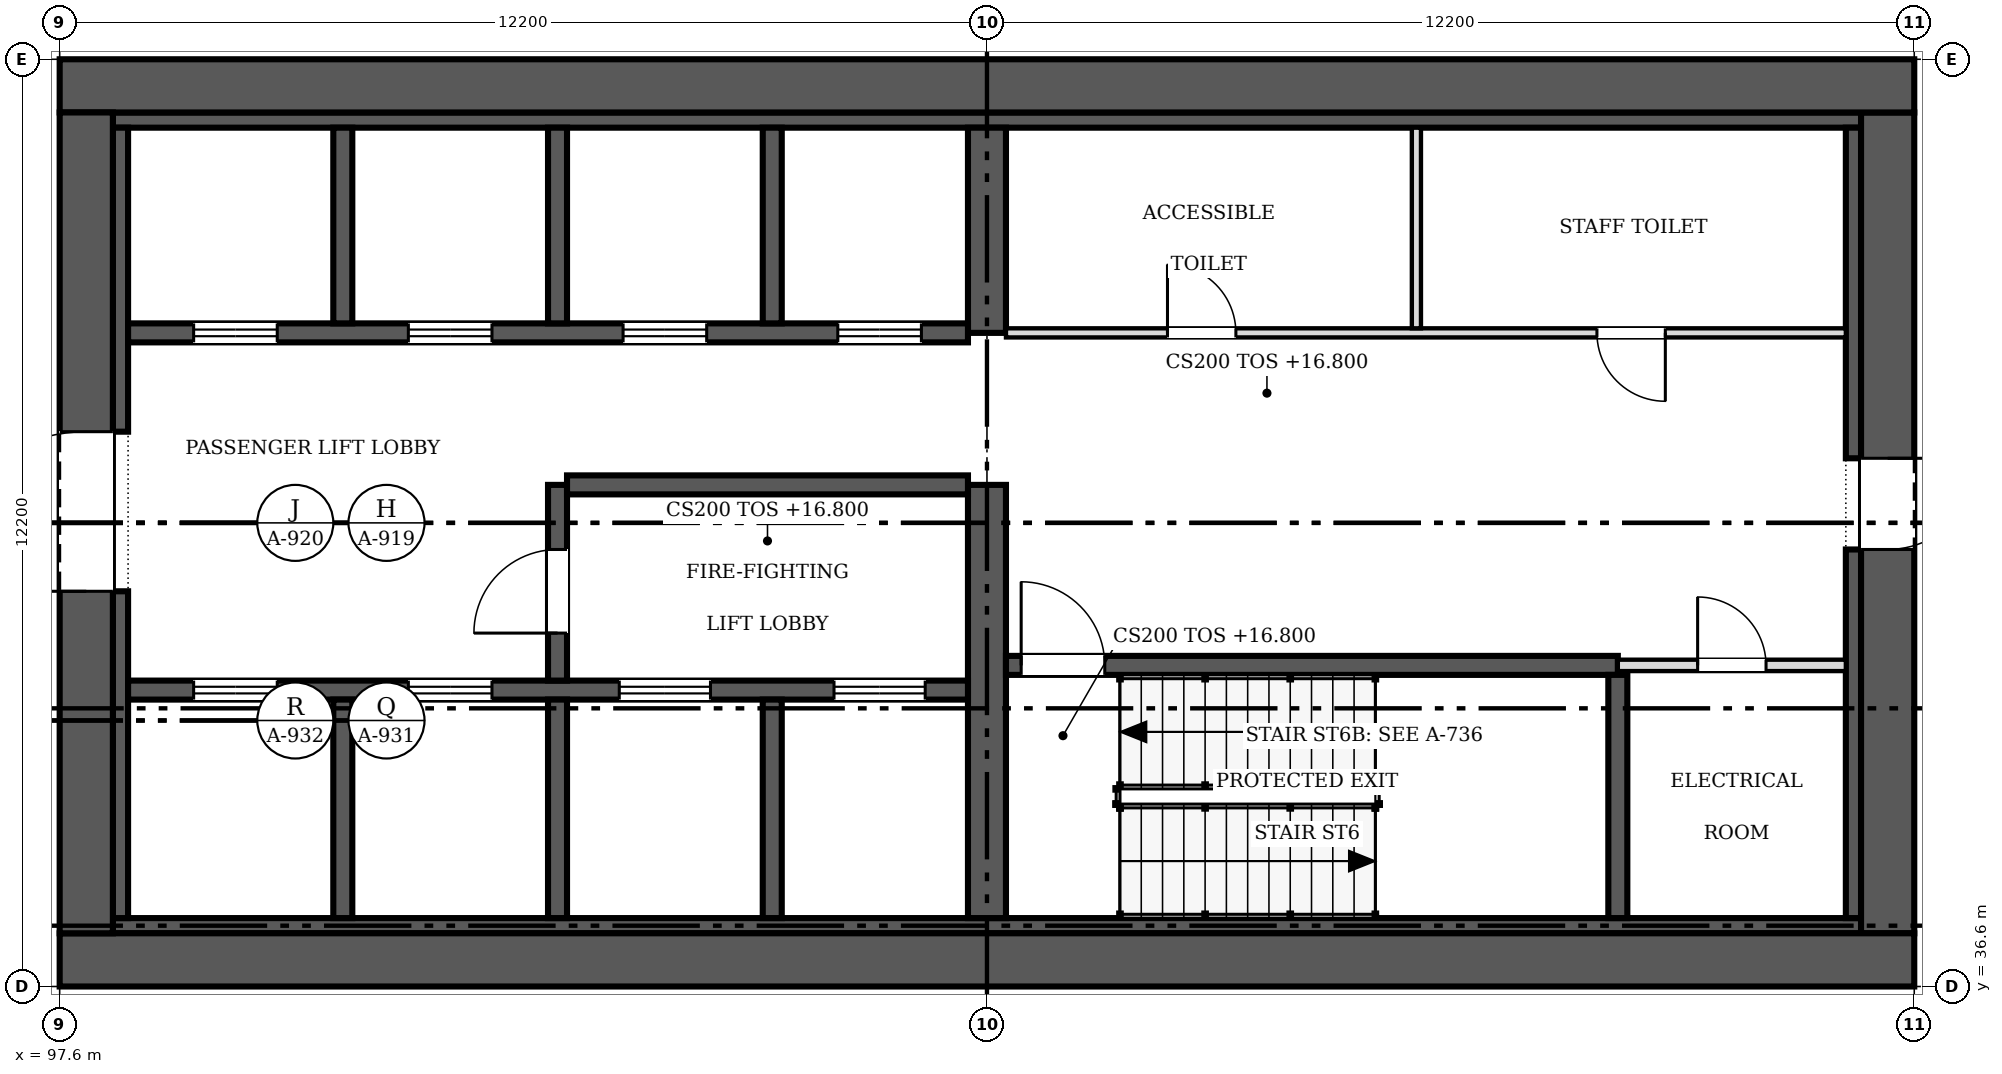
"""IFC4 building model, lengths in metres.
Left out: names, types, materials, properties, quantities, classifications, styles, units other than length and angle.
Written with IfcOpenShell. Run it as: python <this file> out.ifc"""

import sys

from ifc_helpers import new_model, si_unit, direction, frame, frame_2d, origin, place, context, subcontext, project, spatial, rectangle, extrude, source, transform, mapped, element, fill, save


model = new_model("IFC4")
c1 = context("Model", 3, precision=1e-05, world=origin(), true_north=direction((0.0, 1.0)))
c2 = subcontext(c1, "Body", "Model", "MODEL_VIEW")
j1 = project(units=[si_unit("LENGTHUNIT", "METRE"), si_unit("PLANEANGLEUNIT", "RADIAN")], contexts=[c1])
p1 = place(None, origin())
s1 = spatial("IfcSite", under=j1, at=p1, CompositionType="ELEMENT")
p2 = place(p1, origin())
s2 = spatial("IfcBuilding", under=s1, at=p2, CompositionType="ELEMENT")
p3 = place(p2, frame((0.0, 0.0, 16.8)))
s3 = spatial("IfcBuildingStorey", under=s2, at=p3, CompositionType="ELEMENT", Elevation=16.8)
p4 = place(p3, frame((122.0, 36.95, 0.0), z_axis=(0.0, 0.0, 1.0), x_axis=(-1.0, 0.0, 0.0)))
e1 = element("IfcWall", 1, at=p4, inside=s3, PredefinedType="SHEAR", context=c2, shape_type="SweptSolid", body=[
    extrude(rectangle(XDim=24.4, YDim=0.7, at=frame_2d((12.2, 0.0))), origin(), (0.0, 0.0, 1.0), 4.5),
])
p5 = place(p3, frame((97.95, 37.3, 0.0), z_axis=(0.0, 0.0, 1.0), x_axis=(0.0, 1.0, 0.0)))
e2 = element("IfcWall", 2, at=p5, inside=s3, PredefinedType="SHEAR", context=c2, shape_type="SweptSolid", body=[
    extrude(rectangle(XDim=10.8, YDim=0.7, at=frame_2d((5.4, 0.0))), origin(), (0.0, 0.0, 1.0), 4.5),
])
m1 = source(origin(), c2, "Body", "SweptSolid", [
    extrude(rectangle(XDim=2.1, YDim=2.4, at=frame_2d((1.05, 1.2))), frame((0.0, 0.36, 0.0), z_axis=(0.0, -1.0, 0.0), x_axis=(1.0, 0.0, 0.0)), (0.0, 0.0, 1.0), 0.72),
])
p6 = place(p5, frame((4.5, 0.0, 0.0)))
e3 = element("IfcOpeningElement", 3, at=p6, cuts=e2, PredefinedType="OPENING", context=c2, shape_type="MappedRepresentation", body=[
    mapped(m1, transform((0.0, 0.0, 0.0), scale=1.0)),
])
p7 = place(p3, frame((97.6, 48.45, 0.0), z_axis=(0.0, 0.0, 1.0), x_axis=(1.0, 0.0, 0.0)))
e4 = element("IfcWall", 4, at=p7, inside=s3, PredefinedType="SHEAR", context=c2, shape_type="SweptSolid", body=[
    extrude(rectangle(XDim=24.4, YDim=0.7, at=frame_2d((12.2, 0.0))), origin(), (0.0, 0.0, 1.0), 4.5),
])
p8 = place(p3, frame((121.65, 48.1, 0.0), z_axis=(0.0, 0.0, 1.0), x_axis=(0.0, -1.0, 0.0)))
e5 = element("IfcWall", 5, at=p8, inside=s3, PredefinedType="SHEAR", context=c2, shape_type="SweptSolid", body=[
    extrude(rectangle(XDim=10.8, YDim=0.7, at=frame_2d((5.4, 0.0))), origin(), (0.0, 0.0, 1.0), 4.5),
])
m2 = source(origin(), c2, "Body", "SweptSolid", [
    extrude(rectangle(XDim=1.2, YDim=2.1, at=frame_2d((0.6, 1.05))), frame((0.0, 0.36, 0.0), z_axis=(0.0, -1.0, 0.0), x_axis=(1.0, 0.0, 0.0)), (0.0, 0.0, 1.0), 0.72),
])
p9 = place(p8, frame((4.55, 0.0, 0.0)))
e6 = element("IfcOpeningElement", 6, at=p9, cuts=e5, PredefinedType="OPENING", context=c2, shape_type="MappedRepresentation", body=[
    mapped(m2, transform((0.0, 0.0, 0.0), scale=1.0)),
])
for number, where, z_axis, x_axis in (
    (7, (98.3, 37.4, 0.0), (0.0, 0.0, 1.0), (1.0, 0.0, 0.0)),
    (8, (98.3, 48.0, 0.0), (0.0, 0.0, 1.0), (1.0, 0.0, 0.0)),
):
    element("IfcWall", number, at=place(p3, frame(where, z_axis=z_axis, x_axis=x_axis)), inside=s3, PredefinedType="SOLIDWALL", context=c2, shape_type="SweptSolid", body=[
        extrude(rectangle(XDim=23.0, YDim=0.2, at=frame_2d((11.5, 0.0))), origin(), (0.0, 0.0, 1.0), 4.5),
    ])
p10 = place(p3, frame((98.4, 37.5, 0.0), z_axis=(0.0, 0.0, 1.0), x_axis=(0.0, 1.0, 0.0)))
e9 = element("IfcWall", 9, at=p10, inside=s3, PredefinedType="SOLIDWALL", context=c2, shape_type="SweptSolid", body=[
    extrude(rectangle(XDim=4.3, YDim=0.2, at=frame_2d((2.15, 0.0))), origin(), (0.0, 0.0, 1.0), 4.5),
])
p11 = place(p3, frame((98.4, 43.9, 0.0), z_axis=(0.0, 0.0, 1.0), x_axis=(0.0, 1.0, 0.0)))
e10 = element("IfcWall", 10, at=p11, inside=s3, PredefinedType="SOLIDWALL", context=c2, shape_type="SweptSolid", body=[
    extrude(rectangle(XDim=4.0, YDim=0.2, at=frame_2d((2.0, 0.0))), origin(), (0.0, 0.0, 1.0), 4.5),
])
p12 = place(p3, frame((121.2, 37.5, 0.0), z_axis=(0.0, 0.0, 1.0), x_axis=(0.0, 1.0, 0.0)))
e11 = element("IfcWall", 11, at=p12, inside=s3, PredefinedType="SOLIDWALL", context=c2, shape_type="SweptSolid", body=[
    extrude(rectangle(XDim=4.85, YDim=0.2, at=frame_2d((2.425, 0.0))), origin(), (0.0, 0.0, 1.0), 4.5),
])
p13 = place(p3, frame((121.2, 43.55, 0.0), z_axis=(0.0, 0.0, 1.0), x_axis=(0.0, 1.0, 0.0)))
e12 = element("IfcWall", 12, at=p13, inside=s3, PredefinedType="SOLIDWALL", context=c2, shape_type="SweptSolid", body=[
    extrude(rectangle(XDim=4.35, YDim=0.2, at=frame_2d((2.175, 0.0))), origin(), (0.0, 0.0, 1.0), 4.5),
])
p14 = place(p3, frame((109.8, 37.5, 0.0), z_axis=(0.0, 0.0, 1.0), x_axis=(0.0, 1.0, 0.0)))
e13 = element("IfcWall", 13, at=p14, inside=s3, PredefinedType="SHEAR", context=c2, shape_type="SweptSolid", body=[
    extrude(rectangle(XDim=5.7, YDim=0.5, at=frame_2d((2.85, 0.0))), origin(), (0.0, 0.0, 1.0), 4.5),
])
p15 = place(p3, frame((109.8, 45.2, 0.0), z_axis=(0.0, 0.0, 1.0), x_axis=(0.0, 1.0, 0.0)))
e14 = element("IfcWall", 14, at=p15, inside=s3, PredefinedType="SHEAR", context=c2, shape_type="SweptSolid", body=[
    extrude(rectangle(XDim=2.7, YDim=0.5, at=frame_2d((1.35, 0.0))), origin(), (0.0, 0.0, 1.0), 4.5),
])
p16 = place(p3, frame((98.5, 40.5, 0.0), z_axis=(0.0, 0.0, 1.0), x_axis=(1.0, 0.0, 0.0)))
e15 = element("IfcWall", 15, at=p16, inside=s3, PredefinedType="SOLIDWALL", context=c2, shape_type="SweptSolid", body=[
    extrude(rectangle(XDim=11.05, YDim=0.25, at=frame_2d((5.525, 0.0))), origin(), (0.0, 0.0, 1.0), 4.5),
])
m3 = source(origin(), c2, "Body", "SweptSolid", [
    extrude(rectangle(XDim=1.1, YDim=2.1, at=frame_2d((0.55, 1.05))), frame((0.0, 0.135, 0.0), z_axis=(0.0, -1.0, 0.0), x_axis=(1.0, 0.0, 0.0)), (0.0, 0.0, 1.0), 0.27),
])
p17 = place(p16, frame((0.863, 0.0, 0.0)))
e16 = element("IfcOpeningElement", 16, at=p17, cuts=e15, PredefinedType="OPENING", context=c2, shape_type="MappedRepresentation", body=[
    mapped(m3, transform((0.0, 0.0, 0.0), scale=1.0)),
])
p18 = place(p16, frame((3.688, 0.0, 0.0)))
e17 = element("IfcOpeningElement", 17, at=p18, cuts=e15, PredefinedType="OPENING", context=c2, shape_type="MappedRepresentation", body=[
    mapped(m3, transform((0.0, 0.0, 0.0), scale=1.0)),
])
m4 = source(origin(), c2, "Body", "SweptSolid", [
    extrude(rectangle(XDim=1.2, YDim=2.1, at=frame_2d((0.6, 1.05))), frame((0.0, 0.135, 0.0), z_axis=(0.0, -1.0, 0.0), x_axis=(1.0, 0.0, 0.0)), (0.0, 0.0, 1.0), 0.27),
])
p19 = place(p16, frame((6.462, 0.0, 0.0)))
e18 = element("IfcOpeningElement", 18, at=p19, cuts=e15, PredefinedType="OPENING", context=c2, shape_type="MappedRepresentation", body=[
    mapped(m4, transform((0.0, 0.0, 0.0), scale=1.0)),
])
p20 = place(p16, frame((9.288, 0.0, 0.0)))
e19 = element("IfcOpeningElement", 19, at=p20, cuts=e15, PredefinedType="OPENING", context=c2, shape_type="MappedRepresentation", body=[
    mapped(m4, transform((0.0, 0.0, 0.0), scale=1.0)),
])
p21 = place(p3, frame((109.55, 45.2, 0.0), z_axis=(0.0, 0.0, 1.0), x_axis=(-1.0, 0.0, 0.0)))
e20 = element("IfcWall", 20, at=p21, inside=s3, PredefinedType="SOLIDWALL", context=c2, shape_type="SweptSolid", body=[
    extrude(rectangle(XDim=11.05, YDim=0.25, at=frame_2d((5.525, 0.0))), origin(), (0.0, 0.0, 1.0), 4.5),
])
p22 = place(p21, frame((9.087, 0.0, 0.0)))
e21 = element("IfcOpeningElement", 21, at=p22, cuts=e20, PredefinedType="OPENING", context=c2, shape_type="MappedRepresentation", body=[
    mapped(m3, transform((0.0, 0.0, 0.0), scale=1.0)),
])
p23 = place(p21, frame((6.262, 0.0, 0.0)))
e22 = element("IfcOpeningElement", 22, at=p23, cuts=e20, PredefinedType="OPENING", context=c2, shape_type="MappedRepresentation", body=[
    mapped(m3, transform((0.0, 0.0, 0.0), scale=1.0)),
])
p24 = place(p21, frame((3.438, 0.0, 0.0)))
e23 = element("IfcOpeningElement", 23, at=p24, cuts=e20, PredefinedType="OPENING", context=c2, shape_type="MappedRepresentation", body=[
    mapped(m3, transform((0.0, 0.0, 0.0), scale=1.0)),
])
p25 = place(p21, frame((0.613, 0.0, 0.0)))
e24 = element("IfcOpeningElement", 24, at=p25, cuts=e20, PredefinedType="OPENING", context=c2, shape_type="MappedRepresentation", body=[
    mapped(m3, transform((0.0, 0.0, 0.0), scale=1.0)),
])
p26 = place(p3, frame((118.1, 40.825, 0.0), z_axis=(0.0, 0.0, 1.0), x_axis=(-1.0, 0.0, 0.0)))
e25 = element("IfcWall", 25, at=p26, inside=s3, PredefinedType="SOLIDWALL", context=c2, shape_type="SweptSolid", body=[
    extrude(rectangle(XDim=8.05, YDim=0.25, at=frame_2d((4.025, 0.0))), origin(), (0.0, 0.0, 1.0), 4.5),
])
p27 = place(p26, frame((6.75, 0.0, 0.0)))
e26 = element("IfcOpeningElement", 26, at=p27, cuts=e25, PredefinedType="OPENING", context=c2, shape_type="MappedRepresentation", body=[
    mapped(m3, transform((0.0, 0.0, 0.0), scale=1.0)),
])
p28 = place(p3, frame((104.15, 37.5, 0.0), z_axis=(0.0, 0.0, 1.0), x_axis=(0.0, 1.0, 0.0)))
e27 = element("IfcWall", 27, at=p28, inside=s3, PredefinedType="SOLIDWALL", context=c2, shape_type="SweptSolid", body=[
    extrude(rectangle(XDim=2.875, YDim=0.25, at=frame_2d((1.438, 0.0))), origin(), (0.0, 0.0, 1.0), 4.5),
])
p29 = place(p3, frame((104.15, 43.2, 0.0), z_axis=(0.0, 0.0, 1.0), x_axis=(0.0, -1.0, 0.0)))
e28 = element("IfcWall", 28, at=p29, inside=s3, PredefinedType="SOLIDWALL", context=c2, shape_type="SweptSolid", body=[
    extrude(rectangle(XDim=2.575, YDim=0.25, at=frame_2d((1.288, 0.0))), origin(), (0.0, 0.0, 1.0), 4.5),
])
p30 = place(p29, frame((0.85, 0.0, 0.0)))
e29 = element("IfcOpeningElement", 29, at=p30, cuts=e28, PredefinedType="OPENING", context=c2, shape_type="MappedRepresentation", body=[
    mapped(m3, transform((0.0, 0.0, 0.0), scale=1.0)),
])
p31 = place(p3, frame((104.275, 43.2, 0.0), z_axis=(0.0, 0.0, 1.0), x_axis=(1.0, 0.0, 0.0)))
e30 = element("IfcWall", 30, at=p31, inside=s3, PredefinedType="SOLIDWALL", context=c2, shape_type="SweptSolid", body=[
    extrude(rectangle(XDim=5.275, YDim=0.25, at=frame_2d((2.638, 0.0))), origin(), (0.0, 0.0, 1.0), 4.5),
])
p32 = place(p3, frame((118.1, 37.5, 0.0), z_axis=(0.0, 0.0, 1.0), x_axis=(0.0, 1.0, 0.0)))
e31 = element("IfcWall", 31, at=p32, inside=s3, PredefinedType="SOLIDWALL", context=c2, shape_type="SweptSolid", body=[
    extrude(rectangle(XDim=3.2, YDim=0.25, at=frame_2d((1.6, 0.0))), origin(), (0.0, 0.0, 1.0), 4.5),
])
for number, where, z_axis, x_axis in (
    (32, (101.325, 37.5, 0.0), (0.0, 0.0, 1.0), (0.0, 1.0, 0.0)),
    (33, (106.975, 37.5, 0.0), (0.0, 0.0, 1.0), (0.0, 1.0, 0.0)),
):
    element("IfcWall", number, at=place(p3, frame(where, z_axis=z_axis, x_axis=x_axis)), inside=s3, PredefinedType="SOLIDWALL", context=c2, shape_type="SweptSolid", body=[
        extrude(rectangle(XDim=2.875, YDim=0.25, at=frame_2d((1.438, 0.0))), origin(), (0.0, 0.0, 1.0), 4.5),
    ])
for number, where, z_axis, x_axis in (
    (34, (101.325, 45.325, 0.0), (0.0, 0.0, 1.0), (0.0, 1.0, 0.0)),
    (35, (104.15, 45.325, 0.0), (0.0, 0.0, 1.0), (0.0, 1.0, 0.0)),
    (36, (106.975, 45.325, 0.0), (0.0, 0.0, 1.0), (0.0, 1.0, 0.0)),
):
    element("IfcWall", number, at=place(p3, frame(where, z_axis=z_axis, x_axis=x_axis)), inside=s3, PredefinedType="SOLIDWALL", context=c2, shape_type="SweptSolid", body=[
        extrude(rectangle(XDim=2.575, YDim=0.25, at=frame_2d((1.288, 0.0))), origin(), (0.0, 0.0, 1.0), 4.5),
    ])
p33 = place(p3, frame((110.05, 45.2, 0.0), z_axis=(0.0, 0.0, 1.0), x_axis=(1.0, 0.0, 0.0)))
e37 = element("IfcWall", 37, at=p33, inside=s3, PredefinedType="PARTITIONING", context=c2, shape_type="SweptSolid", body=[
    extrude(rectangle(XDim=11.05, YDim=0.12, at=frame_2d((5.525, 0.0))), origin(), (0.0, 0.0, 1.0), 4.3),
])
m5 = source(origin(), c2, "Body", "SweptSolid", [
    extrude(rectangle(XDim=0.9, YDim=2.1, at=frame_2d((0.45, 1.05))), frame((0.0, 0.07, 0.0), z_axis=(0.0, -1.0, 0.0), x_axis=(1.0, 0.0, 0.0)), (0.0, 0.0, 1.0), 0.14),
])
p34 = place(p33, frame((2.125, 0.0, 0.0)))
e38 = element("IfcOpeningElement", 38, at=p34, cuts=e37, PredefinedType="OPENING", context=c2, shape_type="MappedRepresentation", body=[
    mapped(m5, transform((0.0, 0.0, 0.0), scale=1.0)),
])
p35 = place(p33, frame((7.775, 0.0, 0.0)))
e39 = element("IfcOpeningElement", 39, at=p35, cuts=e37, PredefinedType="OPENING", context=c2, shape_type="MappedRepresentation", body=[
    mapped(m5, transform((0.0, 0.0, 0.0), scale=1.0)),
])
p36 = place(p3, frame((121.1, 40.825, 0.0), z_axis=(0.0, 0.0, 1.0), x_axis=(-1.0, 0.0, 0.0)))
e40 = element("IfcWall", 40, at=p36, inside=s3, PredefinedType="PARTITIONING", context=c2, shape_type="SweptSolid", body=[
    extrude(rectangle(XDim=3.0, YDim=0.15, at=frame_2d((1.5, 0.0))), origin(), (0.0, 0.0, 1.0), 4.3),
])
m6 = source(origin(), c2, "Body", "SweptSolid", [
    extrude(rectangle(XDim=0.9, YDim=2.1, at=frame_2d((0.45, 1.05))), frame((0.0, 0.085, 0.0), z_axis=(0.0, -1.0, 0.0), x_axis=(1.0, 0.0, 0.0)), (0.0, 0.0, 1.0), 0.17),
])
p37 = place(p36, frame((1.05, 0.0, 0.0)))
e41 = element("IfcOpeningElement", 41, at=p37, cuts=e40, PredefinedType="OPENING", context=c2, shape_type="MappedRepresentation", body=[
    mapped(m6, transform((0.0, 0.0, 0.0), scale=1.0)),
])
p38 = place(p3, frame((115.45, 45.26, 0.0), z_axis=(0.0, 0.0, 1.0), x_axis=(0.0, 1.0, 0.0)))
e42 = element("IfcWall", 42, at=p38, inside=s3, PredefinedType="PARTITIONING", context=c2, shape_type="SweptSolid", body=[
    extrude(rectangle(XDim=2.64, YDim=0.12, at=frame_2d((1.32, 0.0))), origin(), (0.0, 0.0, 1.0), 4.3),
])
m7 = source(origin(), c2, "Body", "SweptSolid", [
    extrude(rectangle(XDim=2.1, YDim=2.4, at=frame_2d((1.05, 1.2))), frame((0.0, 0.025, 0.0), z_axis=(0.0, -1.0, 0.0), x_axis=(1.0, 0.0, 0.0)), (0.0, 0.0, 1.0), 0.05),
])
p39 = place(p6, origin())
e43 = element("IfcDoor", 43, at=p39, inside=s3, OperationType="DOUBLE_DOOR_SINGLE_SWING", PredefinedType="DOOR", context=c2, shape_type="MappedRepresentation", body=[
    mapped(m7, transform((0.0, 0.0, 0.0), scale=1.0)),
])
fill(e3, e43)
m8 = source(origin(), c2, "Body", "SweptSolid", [
    extrude(rectangle(XDim=1.2, YDim=2.1, at=frame_2d((0.6, 1.05))), frame((0.0, 0.025, 0.0), z_axis=(0.0, -1.0, 0.0), x_axis=(1.0, 0.0, 0.0)), (0.0, 0.0, 1.0), 0.05),
])
p40 = place(p9, origin())
e44 = element("IfcDoor", 44, at=p40, inside=s3, OperationType="SINGLE_SWING_LEFT", PredefinedType="DOOR", context=c2, shape_type="MappedRepresentation", body=[
    mapped(m8, transform((0.0, 0.0, 0.0), scale=1.0)),
])
fill(e6, e44)
m9 = source(origin(), c2, "Body", "SweptSolid", [
    extrude(rectangle(XDim=1.1, YDim=2.1, at=frame_2d((0.55, 1.05))), frame((0.0, 0.025, 0.0), z_axis=(0.0, -1.0, 0.0), x_axis=(1.0, 0.0, 0.0)), (0.0, 0.0, 1.0), 0.05),
])
p41 = place(p17, origin())
e45 = element("IfcDoor", 45, at=p41, inside=s3, OperationType="DOUBLE_DOOR_SLIDING", PredefinedType="DOOR", context=c2, shape_type="MappedRepresentation", body=[
    mapped(m9, transform((0.0, 0.0, 0.0), scale=1.0)),
])
fill(e16, e45)
p42 = place(p18, origin())
e46 = element("IfcDoor", 46, at=p42, inside=s3, OperationType="DOUBLE_DOOR_SLIDING", PredefinedType="DOOR", context=c2, shape_type="MappedRepresentation", body=[
    mapped(m9, transform((0.0, 0.0, 0.0), scale=1.0)),
])
fill(e17, e46)
p43 = place(p19, origin())
e47 = element("IfcDoor", 47, at=p43, inside=s3, OperationType="DOUBLE_DOOR_SLIDING", PredefinedType="DOOR", context=c2, shape_type="MappedRepresentation", body=[
    mapped(m8, transform((0.0, 0.0, 0.0), scale=1.0)),
])
fill(e18, e47)
p44 = place(p20, origin())
e48 = element("IfcDoor", 48, at=p44, inside=s3, OperationType="DOUBLE_DOOR_SLIDING", PredefinedType="DOOR", context=c2, shape_type="MappedRepresentation", body=[
    mapped(m8, transform((0.0, 0.0, 0.0), scale=1.0)),
])
fill(e19, e48)
p45 = place(p22, origin())
e49 = element("IfcDoor", 49, at=p45, inside=s3, OperationType="DOUBLE_DOOR_SLIDING", PredefinedType="DOOR", context=c2, shape_type="MappedRepresentation", body=[
    mapped(m9, transform((0.0, 0.0, 0.0), scale=1.0)),
])
fill(e21, e49)
p46 = place(p23, origin())
e50 = element("IfcDoor", 50, at=p46, inside=s3, OperationType="DOUBLE_DOOR_SLIDING", PredefinedType="DOOR", context=c2, shape_type="MappedRepresentation", body=[
    mapped(m9, transform((0.0, 0.0, 0.0), scale=1.0)),
])
fill(e22, e50)
p47 = place(p24, origin())
e51 = element("IfcDoor", 51, at=p47, inside=s3, OperationType="DOUBLE_DOOR_SLIDING", PredefinedType="DOOR", context=c2, shape_type="MappedRepresentation", body=[
    mapped(m9, transform((0.0, 0.0, 0.0), scale=1.0)),
])
fill(e23, e51)
p48 = place(p25, origin())
e52 = element("IfcDoor", 52, at=p48, inside=s3, OperationType="DOUBLE_DOOR_SLIDING", PredefinedType="DOOR", context=c2, shape_type="MappedRepresentation", body=[
    mapped(m9, transform((0.0, 0.0, 0.0), scale=1.0)),
])
fill(e24, e52)
p49 = place(p27, origin())
e53 = element("IfcDoor", 53, at=p49, inside=s3, OperationType="SINGLE_SWING_RIGHT", PredefinedType="DOOR", context=c2, shape_type="MappedRepresentation", body=[
    mapped(m9, transform((0.0, 0.0, 0.0), scale=1.0)),
])
fill(e26, e53)
p50 = place(p30, origin())
e54 = element("IfcDoor", 54, at=p50, inside=s3, OperationType="SINGLE_SWING_RIGHT", PredefinedType="DOOR", context=c2, shape_type="MappedRepresentation", body=[
    mapped(m9, transform((0.0, 0.0, 0.0), scale=1.0)),
])
fill(e29, e54)
m10 = source(origin(), c2, "Body", "SweptSolid", [
    extrude(rectangle(XDim=0.9, YDim=2.1, at=frame_2d((0.45, 1.05))), frame((0.0, 0.025, 0.0), z_axis=(0.0, -1.0, 0.0), x_axis=(1.0, 0.0, 0.0)), (0.0, 0.0, 1.0), 0.05),
])
p51 = place(p34, origin())
e55 = element("IfcDoor", 55, at=p51, inside=s3, OperationType="SINGLE_SWING_LEFT", PredefinedType="DOOR", context=c2, shape_type="MappedRepresentation", body=[
    mapped(m10, transform((0.0, 0.0, 0.0), scale=1.0)),
])
fill(e38, e55)
p52 = place(p35, origin())
e56 = element("IfcDoor", 56, at=p52, inside=s3, OperationType="SINGLE_SWING_RIGHT", PredefinedType="DOOR", context=c2, shape_type="MappedRepresentation", body=[
    mapped(m10, transform((0.0, 0.0, 0.0), scale=1.0)),
])
fill(e39, e56)
p53 = place(p37, origin())
e57 = element("IfcDoor", 57, at=p53, inside=s3, OperationType="SINGLE_SWING_RIGHT", PredefinedType="DOOR", context=c2, shape_type="MappedRepresentation", body=[
    mapped(m10, transform((0.0, 0.0, 0.0), scale=1.0)),
])
fill(e41, e57)
save(model, sys.argv[1])
